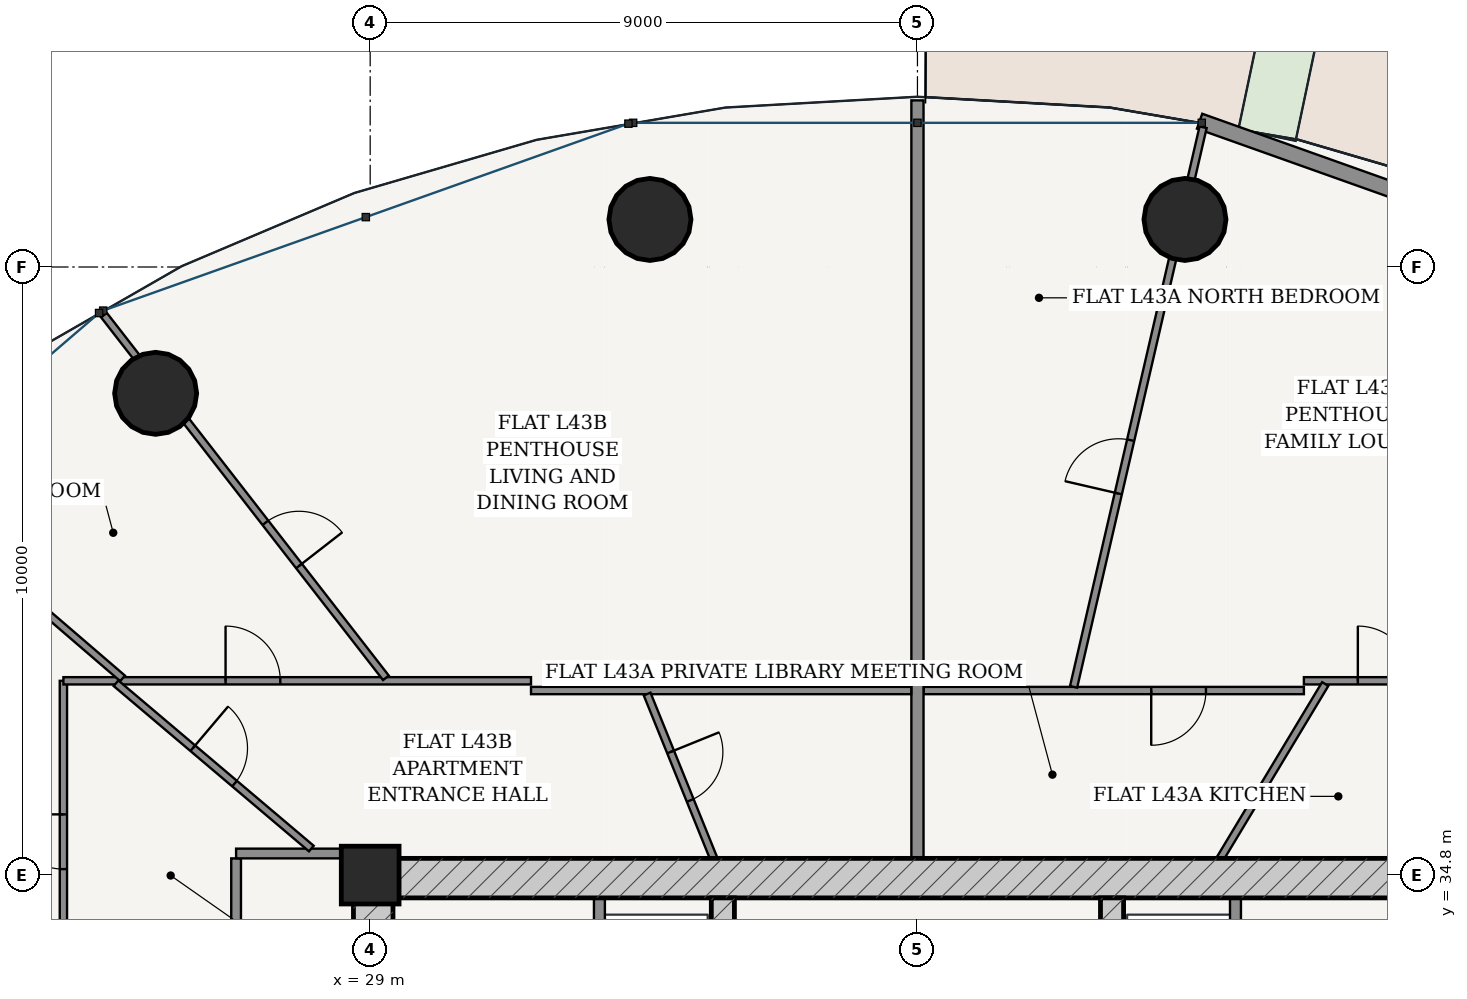
"""IFC4 building model, lengths in metres.
Left out: names, types, materials, properties, quantities, classifications, styles, units other than length and angle.
Written with IfcOpenShell. Run it as: python <this file> out.ifc"""

import sys

from ifc_helpers import new_model, si_unit, direction, frame, frame_2d, origin, origin_2d, place, context, subcontext, project, spatial, rectangle, hollow_circle, extrude, source, transform, mapped, element, fill, save


model = new_model("IFC4")
c1 = context("Model", 3, precision=1e-05, world=origin(), true_north=direction((-0.2419218956, 0.970295726276)))
c2 = subcontext(c1, "Body", "Model", "MODEL_VIEW")
j1 = project(units=[si_unit("LENGTHUNIT", "METRE"), si_unit("PLANEANGLEUNIT", "RADIAN")], contexts=[c1])
p1 = place(None, origin())
s1 = spatial("IfcSite", under=j1, at=p1, CompositionType="ELEMENT")
p2 = place(p1, origin())
s2 = spatial("IfcBuilding", under=s1, at=p2, CompositionType="ELEMENT")
p3 = place(p2, frame((0.0, 0.0, 164.2)))
s3 = spatial("IfcBuildingStorey", under=s2, at=p3, CompositionType="ELEMENT", Elevation=164.2)
p4 = place(p3, frame((29.0, 34.8, 0.0), z_axis=(0.0, 0.0, 1.0), x_axis=(1.0, 0.0, 0.0)))
e1 = element("IfcColumn", 1, at=p4, inside=s3, PredefinedType="COLUMN", context=c2, shape_type="SweptSolid", body=[
    extrude(rectangle(XDim=0.95, YDim=0.95, at=origin_2d()), origin(), (0.0, 0.0, 1.0), 3.6),
])
p5 = place(p3, frame((28.725, 34.75, 0.0), z_axis=(0.0, 0.0, 1.0), x_axis=(1.0, 0.0, 0.0)))
e2 = element("IfcWall", 2, at=p5, inside=s3, PredefinedType="SHEAR", context=c2, shape_type="SweptSolid", body=[
    extrude(rectangle(XDim=18.55, YDim=0.65, at=frame_2d((9.275, 0.0))), origin(), (0.0, 0.0, 1.0), 3.33),
])
p6 = place(p3, frame((29.05, 19.175, 0.0), z_axis=(0.0, 0.0, 1.0), x_axis=(0.0, 1.0, 0.0)))
e3 = element("IfcWall", 3, at=p6, inside=s3, PredefinedType="SHEAR", context=c2, shape_type="SweptSolid", body=[
    extrude(rectangle(XDim=15.25, YDim=0.65, at=frame_2d((7.625, 0.0))), origin(), (0.0, 0.0, 1.0), 3.33),
])
p7 = place(p6, frame((9.875, 0.0, 0.0)))
e4 = element("IfcOpeningElement", 4, at=p7, cuts=e3, PredefinedType="OPENING", context=c2, shape_type="SweptSolid", body=[
    extrude(rectangle(XDim=1.5, YDim=2.2, at=frame_2d((0.75, 1.1))), frame((0.0, 0.335, 0.0), z_axis=(0.0, -1.0, 0.0), x_axis=(1.0, 0.0, 0.0)), (0.0, 0.0, 1.0), 0.67),
])
p8 = place(p3, frame((34.8, 19.175, 0.0), z_axis=(0.0, 0.0, 1.0), x_axis=(0.0, 1.0, 0.0)))
e5 = element("IfcWall", 5, at=p8, inside=s3, PredefinedType="SHEAR", context=c2, shape_type="SweptSolid", body=[
    extrude(rectangle(XDim=15.25, YDim=0.38, at=frame_2d((7.625, 0.0))), origin(), (0.0, 0.0, 1.0), 3.33),
])
p9 = place(p8, frame((7.8, 0.0, 0.0)))
e6 = element("IfcOpeningElement", 6, at=p9, cuts=e5, PredefinedType="OPENING", context=c2, shape_type="SweptSolid", body=[
    extrude(rectangle(XDim=1.05, YDim=2.15, at=frame_2d((0.525, 1.075))), frame((0.0, 0.2, 0.0), z_axis=(0.0, -1.0, 0.0), x_axis=(1.0, 0.0, 0.0)), (0.0, 0.0, 1.0), 0.4),
])
p10 = place(p3, frame((41.2, 19.175, 0.0), z_axis=(0.0, 0.0, 1.0), x_axis=(0.0, 1.0, 0.0)))
e7 = element("IfcWall", 7, at=p10, inside=s3, PredefinedType="SHEAR", context=c2, shape_type="SweptSolid", body=[
    extrude(rectangle(XDim=15.25, YDim=0.38, at=frame_2d((7.625, 0.0))), origin(), (0.0, 0.0, 1.0), 3.33),
])
p11 = place(p10, frame((7.8, 0.0, 0.0)))
e8 = element("IfcOpeningElement", 8, at=p11, cuts=e7, PredefinedType="OPENING", context=c2, shape_type="SweptSolid", body=[
    extrude(rectangle(XDim=1.05, YDim=2.15, at=frame_2d((0.525, 1.075))), frame((0.0, 0.2, 0.0), z_axis=(0.0, -1.0, 0.0), x_axis=(1.0, 0.0, 0.0)), (0.0, 0.0, 1.0), 0.4),
])
for number, where, z_axis, x_axis in (
    (9, (42.399, 45.582, 0.0), (0.0, 0.0, 1.0), (1.0, 0.0, 0.0)),
    (10, (33.601, 45.582, 0.0), (0.0, 0.0, 1.0), (1.0, 0.0, 0.0)),
    (11, (25.472, 42.723, 0.0), (0.0, 0.0, 1.0), (1.0, 0.0, 0.0)),
):
    element("IfcColumn", number, at=place(p3, frame(where, z_axis=z_axis, x_axis=x_axis)), inside=s3, PredefinedType="COLUMN", context=c2, shape_type="SweptSolid", body=[
        extrude(hollow_circle(Radius=0.675, WallThickness=0.042, at=origin_2d()), origin(), (0.0, 0.0, 1.0), 3.6),
    ])
p12 = place(p3, frame((51.503, 44.043, 0.0), z_axis=(0.0, 0.0, 1.0), x_axis=(-0.942095406405, 0.335344964522, 0.0)))
e12 = element("IfcWall", 12, at=p12, inside=s3, PredefinedType="SOLIDWALL", context=c2, shape_type="SweptSolid", body=[
    extrude(rectangle(XDim=9.408, YDim=0.26, at=frame_2d((4.704, 0.0))), origin(), (0.0, 0.0, 1.0), 3.33),
])
p13 = place(p12, frame((4.029, 0.0, 0.0)))
e13 = element("IfcOpeningElement", 13, at=p13, cuts=e12, PredefinedType="OPENING", context=c2, shape_type="SweptSolid", body=[
    extrude(rectangle(XDim=1.35, YDim=2.2, at=frame_2d((0.675, 1.1))), frame((0.0, 0.14, 0.0), z_axis=(0.0, -1.0, 0.0), x_axis=(1.0, 0.0, 0.0)), (0.0, 0.0, 1.0), 0.28),
])
p14 = place(p3, frame((32.77, 28.52, 0.0), z_axis=(0.0, 0.0, 1.0), x_axis=(0.0, 1.0, 0.0)))
e14 = element("IfcWall", 14, at=p14, inside=s3, PredefinedType="PARTITIONING", context=c2, shape_type="SweptSolid", body=[
    extrude(rectangle(XDim=5.905, YDim=0.18, at=frame_2d((2.953, 0.0))), origin(), (0.0, 0.0, 1.0), 3.33),
])
p15 = place(p14, frame((3.655, 0.0, 0.0)))
e15 = element("IfcOpeningElement", 15, at=p15, cuts=e14, PredefinedType="OPENING", context=c2, shape_type="SweptSolid", body=[
    extrude(rectangle(XDim=1.15, YDim=2.2, at=frame_2d((0.575, 1.1))), frame((0.0, 0.1, 0.0), z_axis=(0.0, -1.0, 0.0), x_axis=(1.0, 0.0, 0.0)), (0.0, 0.0, 1.0), 0.2),
])
p16 = place(p14, frame((0.73, 0.0, 0.0)))
e16 = element("IfcOpeningElement", 16, at=p16, cuts=e14, PredefinedType="OPENING", context=c2, shape_type="SweptSolid", body=[
    extrude(rectangle(XDim=1.2, YDim=2.25, at=frame_2d((0.6, 1.125))), frame((0.0, 0.1, 0.0), z_axis=(0.0, -1.0, 0.0), x_axis=(1.0, 0.0, 0.0)), (0.0, 0.0, 1.0), 0.2),
])
p17 = place(p3, frame((43.23, 28.52, 0.0), z_axis=(0.0, 0.0, 1.0), x_axis=(0.0, 1.0, 0.0)))
e17 = element("IfcWall", 17, at=p17, inside=s3, PredefinedType="PARTITIONING", context=c2, shape_type="SweptSolid", body=[
    extrude(rectangle(XDim=5.905, YDim=0.18, at=frame_2d((2.953, 0.0))), origin(), (0.0, 0.0, 1.0), 3.33),
])
p18 = place(p17, frame((0.905, 0.0, 0.0)))
e18 = element("IfcOpeningElement", 18, at=p18, cuts=e17, PredefinedType="OPENING", context=c2, shape_type="SweptSolid", body=[
    extrude(rectangle(XDim=0.85, YDim=2.1, at=frame_2d((0.425, 1.05))), frame((0.0, 0.1, 0.0), z_axis=(0.0, -1.0, 0.0), x_axis=(1.0, 0.0, 0.0)), (0.0, 0.0, 1.0), 0.2),
])
p19 = place(p17, frame((3.655, 0.0, 0.0)))
e19 = element("IfcOpeningElement", 19, at=p19, cuts=e17, PredefinedType="OPENING", context=c2, shape_type="SweptSolid", body=[
    extrude(rectangle(XDim=1.15, YDim=2.2, at=frame_2d((0.575, 1.1))), frame((0.0, 0.1, 0.0), z_axis=(0.0, -1.0, 0.0), x_axis=(1.0, 0.0, 0.0)), (0.0, 0.0, 1.0), 0.2),
])
p20 = place(p3, frame((26.795, 24.4, 0.0), z_axis=(0.0, 0.0, 1.0), x_axis=(0.0, 1.0, 0.0)))
e20 = element("IfcWall", 20, at=p20, inside=s3, PredefinedType="PARTITIONING", context=c2, shape_type="SweptSolid", body=[
    extrude(rectangle(XDim=10.675, YDim=0.16, at=frame_2d((5.337, 0.0))), origin(), (0.0, 0.0, 1.0), 2.776),
])
p21 = place(p20, frame((8.422, 0.0, 0.0)))
e21 = element("IfcOpeningElement", 21, at=p21, cuts=e20, PredefinedType="OPENING", context=c2, shape_type="SweptSolid", body=[
    extrude(rectangle(XDim=0.98, YDim=2.2, at=frame_2d((0.49, 1.1))), frame((0.0, 0.09, 0.0), z_axis=(0.0, -1.0, 0.0), x_axis=(1.0, 0.0, 0.0)), (0.0, 0.0, 1.0), 0.18),
])
p22 = place(p3, frame((26.795, 35.155, 0.0), z_axis=(0.0, 0.0, 1.0), x_axis=(1.0, 0.0, 0.0)))
e22 = element("IfcWall", 22, at=p22, inside=s3, PredefinedType="PARTITIONING", context=c2, shape_type="SweptSolid", body=[
    extrude(rectangle(XDim=1.93, YDim=0.16, at=frame_2d((0.965, 0.0))), origin(), (0.0, 0.0, 1.0), 2.776),
])
p23 = place(p3, frame((38.102, 37.835, 0.0), z_axis=(0.0, 0.0, 1.0), x_axis=(1.0, 0.0, 0.0)))
e23 = element("IfcWall", 23, at=p23, inside=s3, PredefinedType="PARTITIONING", context=c2, shape_type="SweptSolid", body=[
    extrude(rectangle(XDim=6.253, YDim=0.12, at=frame_2d((3.126, 0.0))), origin(), (0.0, 0.0, 1.0), 2.776),
])
p24 = place(p23, frame((3.742, 0.0, 0.0)))
e24 = element("IfcOpeningElement", 24, at=p24, cuts=e23, PredefinedType="OPENING", context=c2, shape_type="SweptSolid", body=[
    extrude(rectangle(XDim=0.9, YDim=2.15, at=frame_2d((0.45, 1.075))), frame((0.0, 0.07, 0.0), z_axis=(0.0, -1.0, 0.0), x_axis=(1.0, 0.0, 0.0)), (0.0, 0.0, 1.0), 0.14),
])
p25 = place(p3, frame((44.355, 37.995, 0.0), z_axis=(0.0, 0.0, 1.0), x_axis=(1.0, 0.0, 0.0)))
e25 = element("IfcWall", 25, at=p25, inside=s3, PredefinedType="PARTITIONING", context=c2, shape_type="SweptSolid", body=[
    extrude(rectangle(XDim=7.69, YDim=0.12, at=frame_2d((3.845, 0.0))), origin(), (0.0, 0.0, 1.0), 2.776),
])
p26 = place(p25, frame((0.887, 0.0, 0.0)))
e26 = element("IfcOpeningElement", 26, at=p26, cuts=e25, PredefinedType="OPENING", context=c2, shape_type="SweptSolid", body=[
    extrude(rectangle(XDim=0.9, YDim=2.15, at=frame_2d((0.45, 1.075))), frame((0.0, 0.07, 0.0), z_axis=(0.0, -1.0, 0.0), x_axis=(1.0, 0.0, 0.0)), (0.0, 0.0, 1.0), 0.14),
])
p27 = place(p3, frame((40.568, 37.896, 0.0), z_axis=(0.0, 0.0, 1.0), x_axis=(0.225452174141, 0.974254236416, 0.0)))
e27 = element("IfcWall", 27, at=p27, inside=s3, PredefinedType="PARTITIONING", context=c2, shape_type="SweptSolid", body=[
    extrude(rectangle(XDim=9.446, YDim=0.12, at=frame_2d((4.723, 0.0))), origin(), (0.0, 0.0, 1.0), 2.776),
])
p28 = place(p27, frame((3.264, 0.0, 0.0)))
e28 = element("IfcOpeningElement", 28, at=p28, cuts=e27, PredefinedType="OPENING", context=c2, shape_type="SweptSolid", body=[
    extrude(rectangle(XDim=0.9, YDim=2.15, at=frame_2d((0.45, 1.075))), frame((0.0, 0.07, 0.0), z_axis=(0.0, -1.0, 0.0), x_axis=(1.0, 0.0, 0.0)), (0.0, 0.0, 1.0), 0.14),
])
p29 = place(p3, frame((42.98, 35.075, 0.0), z_axis=(0.0, 0.0, 1.0), x_axis=(0.515686235332, 0.856777512946, 0.0)))
e29 = element("IfcWall", 29, at=p29, inside=s3, PredefinedType="PARTITIONING", context=c2, shape_type="SweptSolid", body=[
    extrude(rectangle(XDim=3.346, YDim=0.12, at=frame_2d((1.673, 0.0))), origin(), (0.0, 0.0, 1.0), 3.33),
])
p30 = place(p3, frame((38.0, 35.075, 0.0), z_axis=(0.0, 0.0, 1.0), x_axis=(0.0, 1.0, 0.0)))
e30 = element("IfcWall", 30, at=p30, inside=s3, PredefinedType="PARTITIONING", context=c2, shape_type="SweptSolid", body=[
    extrude(rectangle(XDim=12.465, YDim=0.2, at=frame_2d((6.232, 0.0))), origin(), (0.0, 0.0, 1.0), 2.415),
])
p31 = place(p3, frame((23.955, 26.902, 0.0), z_axis=(0.0, 0.0, 1.0), x_axis=(0.0, 1.0, 0.0)))
e31 = element("IfcWall", 31, at=p31, inside=s3, PredefinedType="PARTITIONING", context=c2, shape_type="SweptSolid", body=[
    extrude(rectangle(XDim=11.093, YDim=0.12, at=frame_2d((5.546, 0.0))), origin(), (0.0, 0.0, 1.0), 2.776),
])
p32 = place(p31, frame((7.997, 0.0, 0.0)))
e32 = element("IfcOpeningElement", 32, at=p32, cuts=e31, PredefinedType="OPENING", context=c2, shape_type="SweptSolid", body=[
    extrude(rectangle(XDim=0.9, YDim=2.15, at=frame_2d((0.45, 1.075))), frame((0.0, 0.07, 0.0), z_axis=(0.0, -1.0, 0.0), x_axis=(1.0, 0.0, 0.0)), (0.0, 0.0, 1.0), 0.14),
])
p33 = place(p3, frame((23.955, 37.995, 0.0), z_axis=(0.0, 0.0, 1.0), x_axis=(1.0, 0.0, 0.0)))
e33 = element("IfcWall", 33, at=p33, inside=s3, PredefinedType="PARTITIONING", context=c2, shape_type="SweptSolid", body=[
    extrude(rectangle(XDim=7.69, YDim=0.12, at=frame_2d((3.845, 0.0))), origin(), (0.0, 0.0, 1.0), 2.776),
])
p34 = place(p33, frame((2.667, 0.0, 0.0)))
e34 = element("IfcOpeningElement", 34, at=p34, cuts=e33, PredefinedType="OPENING", context=c2, shape_type="SweptSolid", body=[
    extrude(rectangle(XDim=0.9, YDim=2.15, at=frame_2d((0.45, 1.075))), frame((0.0, 0.07, 0.0), z_axis=(0.0, -1.0, 0.0), x_axis=(1.0, 0.0, 0.0)), (0.0, 0.0, 1.0), 0.14),
])
p35 = place(p3, frame((31.645, 37.835, 0.0), z_axis=(0.0, 0.0, 1.0), x_axis=(1.0, 0.0, 0.0)))
e35 = element("IfcWall", 35, at=p35, inside=s3, PredefinedType="PARTITIONING", context=c2, shape_type="SweptSolid", body=[
    extrude(rectangle(XDim=6.253, YDim=0.12, at=frame_2d((3.126, 0.0))), origin(), (0.0, 0.0, 1.0), 2.776),
])
p36 = place(p3, frame((29.259, 38.044, 0.0), z_axis=(0.0, 0.0, 1.0), x_axis=(-0.613770587295, 0.789484430607, 0.0)))
e36 = element("IfcWall", 36, at=p36, inside=s3, PredefinedType="PARTITIONING", context=c2, shape_type="SweptSolid", body=[
    extrude(rectangle(XDim=7.556, YDim=0.12, at=frame_2d((3.778, 0.0))), origin(), (0.0, 0.0, 1.0), 2.776),
])
p37 = place(p36, frame((2.33, 0.0, 0.0)))
e37 = element("IfcOpeningElement", 37, at=p37, cuts=e36, PredefinedType="OPENING", context=c2, shape_type="SweptSolid", body=[
    extrude(rectangle(XDim=0.9, YDim=2.15, at=frame_2d((0.45, 1.075))), frame((0.0, 0.07, 0.0), z_axis=(0.0, -1.0, 0.0), x_axis=(1.0, 0.0, 0.0)), (0.0, 0.0, 1.0), 0.14),
])
p38 = place(p3, frame((24.928, 38.035, 0.0), z_axis=(0.0, 0.0, 1.0), x_axis=(-0.758368609512, 0.65182593697, 0.0)))
e38 = element("IfcWall", 38, at=p38, inside=s3, PredefinedType="PARTITIONING", context=c2, shape_type="SweptSolid", body=[
    extrude(rectangle(XDim=5.263, YDim=0.12, at=frame_2d((2.632, 0.0))), origin(), (0.0, 0.0, 1.0), 2.846),
])
p39 = place(p3, frame((23.896, 31.821, 0.0), z_axis=(0.0, 0.0, 1.0), x_axis=(-0.942072876428, 0.335408251983, 0.0)))
e39 = element("IfcWall", 39, at=p39, inside=s3, PredefinedType="PARTITIONING", context=c2, shape_type="SweptSolid", body=[
    extrude(rectangle(XDim=8.7, YDim=0.12, at=frame_2d((4.35, 0.0))), origin(), (0.0, 0.0, 1.0), 2.846),
])
p40 = place(p39, frame((3.9, 0.0, 0.0)))
e40 = element("IfcOpeningElement", 40, at=p40, cuts=e39, PredefinedType="OPENING", context=c2, shape_type="SweptSolid", body=[
    extrude(rectangle(XDim=0.9, YDim=2.15, at=frame_2d((0.45, 1.075))), frame((0.0, 0.07, 0.0), z_axis=(0.0, -1.0, 0.0), x_axis=(1.0, 0.0, 0.0)), (0.0, 0.0, 1.0), 0.14),
])
p41 = place(p3, frame((34.649, 35.075, 0.0), z_axis=(0.0, 0.0, 1.0), x_axis=(-0.37535719187, 0.926880239573, 0.0)))
e41 = element("IfcWall", 41, at=p41, inside=s3, PredefinedType="PARTITIONING", context=c2, shape_type="SweptSolid", body=[
    extrude(rectangle(XDim=2.916, YDim=0.12, at=frame_2d((1.458, 0.0))), origin(), (0.0, 0.0, 1.0), 3.33),
])
p42 = place(p41, frame((1.028, 0.0, 0.0)))
e42 = element("IfcOpeningElement", 42, at=p42, cuts=e41, PredefinedType="OPENING", context=c2, shape_type="SweptSolid", body=[
    extrude(rectangle(XDim=0.86, YDim=2.15, at=frame_2d((0.43, 1.075))), frame((0.0, 0.07, 0.0), z_axis=(0.0, -1.0, 0.0), x_axis=(1.0, 0.0, 0.0)), (0.0, 0.0, 1.0), 0.14),
])
p43 = place(p3, frame((28.032, 35.236, 0.0), z_axis=(0.0, 0.0, 1.0), x_axis=(-0.763324664245, 0.646015059388, 0.0)))
e43 = element("IfcWall", 43, at=p43, inside=s3, PredefinedType="PARTITIONING", context=c2, shape_type="SweptSolid", body=[
    extrude(rectangle(XDim=4.208, YDim=0.12, at=frame_2d((2.104, 0.0))), origin(), (0.0, 0.0, 1.0), 3.005),
])
p44 = place(p43, frame((1.654, 0.0, 0.0)))
e44 = element("IfcOpeningElement", 44, at=p44, cuts=e43, PredefinedType="OPENING", context=c2, shape_type="SweptSolid", body=[
    extrude(rectangle(XDim=0.9, YDim=2.15, at=frame_2d((0.45, 1.075))), frame((0.0, 0.07, 0.0), z_axis=(0.0, -1.0, 0.0), x_axis=(1.0, 0.0, 0.0)), (0.0, 0.0, 1.0), 0.14),
])
m1 = source(origin(), c2, "Body", "SweptSolid", [
    extrude(rectangle(XDim=0.9, YDim=2.15, at=frame_2d((0.45, 1.075))), frame((0.0, 0.025, 0.0), z_axis=(0.0, -1.0, 0.0), x_axis=(1.0, 0.0, 0.0)), (0.0, 0.0, 1.0), 0.05),
])
p45 = place(p26, origin())
e45 = element("IfcDoor", 45, at=p45, inside=s3, OperationType="SINGLE_SWING_LEFT", PredefinedType="DOOR", context=c2, shape_type="MappedRepresentation", body=[
    mapped(m1, transform((0.0, 0.0, 0.0), scale=1.0)),
])
fill(e26, e45)
p46 = place(p24, frame((0.9, 0.0, 0.0), z_axis=(0.0, 0.0, 1.0), x_axis=(-1.0, 0.0, 0.0)))
e46 = element("IfcDoor", 46, at=p46, inside=s3, OperationType="SINGLE_SWING_RIGHT", PredefinedType="DOOR", context=c2, shape_type="MappedRepresentation", body=[
    mapped(m1, transform((0.0, 0.0, 0.0), scale=1.0)),
])
fill(e24, e46)
p47 = place(p28, origin())
e47 = element("IfcDoor", 47, at=p47, inside=s3, OperationType="SINGLE_SWING_LEFT", PredefinedType="DOOR", context=c2, shape_type="MappedRepresentation", body=[
    mapped(m1, transform((0.0, 0.0, 0.0), scale=1.0)),
])
fill(e28, e47)
p48 = place(p44, frame((0.9, 0.0, 0.0), z_axis=(0.0, 0.0, 1.0), x_axis=(-1.0, 0.0, 0.0)))
e48 = element("IfcDoor", 48, at=p48, inside=s3, OperationType="SINGLE_SWING_LEFT", PredefinedType="DOOR", context=c2, shape_type="MappedRepresentation", body=[
    mapped(m1, transform((0.0, 0.0, 0.0), scale=1.0)),
])
fill(e44, e48)
p49 = place(p34, origin())
e49 = element("IfcDoor", 49, at=p49, inside=s3, OperationType="SINGLE_SWING_LEFT", PredefinedType="DOOR", context=c2, shape_type="MappedRepresentation", body=[
    mapped(m1, transform((0.0, 0.0, 0.0), scale=1.0)),
])
fill(e34, e49)
p50 = place(p32, origin())
e50 = element("IfcDoor", 50, at=p50, inside=s3, OperationType="SINGLE_SWING_RIGHT", PredefinedType="DOOR", context=c2, shape_type="MappedRepresentation", body=[
    mapped(m1, transform((0.0, 0.0, 0.0), scale=1.0)),
])
fill(e32, e50)
m2 = source(origin(), c2, "Body", "SweptSolid", [
    extrude(rectangle(XDim=0.86, YDim=2.15, at=frame_2d((0.43, 1.075))), frame((0.0, 0.025, 0.0), z_axis=(0.0, -1.0, 0.0), x_axis=(1.0, 0.0, 0.0)), (0.0, 0.0, 1.0), 0.05),
])
p51 = place(p42, frame((0.86, 0.0, 0.0), z_axis=(0.0, 0.0, 1.0), x_axis=(-1.0, 0.0, 0.0)))
e51 = element("IfcDoor", 51, at=p51, inside=s3, OperationType="SINGLE_SWING_LEFT", PredefinedType="DOOR", context=c2, shape_type="MappedRepresentation", body=[
    mapped(m2, transform((0.0, 0.0, 0.0), scale=1.0)),
])
fill(e42, e51)
p52 = place(p37, frame((0.9, 0.0, 0.0), z_axis=(0.0, 0.0, 1.0), x_axis=(-1.0, 0.0, 0.0)))
e52 = element("IfcDoor", 52, at=p52, inside=s3, OperationType="SINGLE_SWING_RIGHT", PredefinedType="DOOR", context=c2, shape_type="MappedRepresentation", body=[
    mapped(m1, transform((0.0, 0.0, 0.0), scale=1.0)),
])
fill(e37, e52)
save(model, sys.argv[1])
